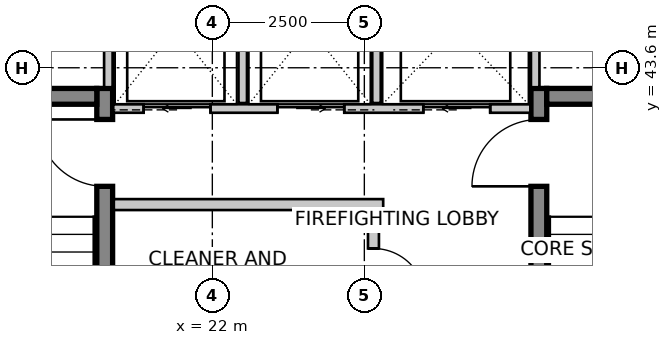
"""IFC4 building model, lengths in metres.
Left out: names, types, materials, properties, quantities, classifications, styles, units other than length and angle.
Written with IfcOpenShell. Run it as: python <this file> out.ifc"""

import sys

from ifc_helpers import new_model, si_unit, direction, frame, frame_2d, origin, place, context, subcontext, project, spatial, rectangle, extrude, source, transform, mapped, element, fill, save


model = new_model("IFC4")
c1 = context("Model", 3, precision=1e-05, world=origin(), true_north=direction((0.0, 1.0)))
c2 = subcontext(c1, "Body", "Model", "MODEL_VIEW")
j1 = project(units=[si_unit("LENGTHUNIT", "METRE"), si_unit("PLANEANGLEUNIT", "RADIAN")], contexts=[c1])
p1 = place(None, origin())
s1 = spatial("IfcSite", under=j1, at=p1, CompositionType="ELEMENT")
p2 = place(p1, origin())
s2 = spatial("IfcBuilding", under=s1, at=p2, CompositionType="ELEMENT")
p3 = place(p2, frame((0.0, 0.0, 79.0)))
s3 = spatial("IfcBuildingStorey", under=s2, at=p3, CompositionType="ELEMENT", Elevation=79.0)
p4 = place(p3, frame((20.23, 34.2, 0.0), z_axis=(0.0, 0.0, 1.0), x_axis=(0.0, 1.0, 0.0)))
e1 = element("IfcWall", 1, at=p4, inside=s3, PredefinedType="SHEAR", context=c2, shape_type="SweptSolid", body=[
    extrude(rectangle(XDim=9.06, YDim=0.26, at=frame_2d((4.53, 0.0))), origin(), (0.0, 0.0, 1.0), 4.0),
])
m1 = source(origin(), c2, "Body", "SweptSolid", [
    extrude(rectangle(XDim=1.1, YDim=2.15, at=frame_2d((0.55, 1.075))), frame((0.0, 0.14, 0.0), z_axis=(0.0, -1.0, 0.0), x_axis=(1.0, 0.0, 0.0)), (0.0, 0.0, 1.0), 0.28),
])
p5 = place(p4, frame((7.45, 0.0, 0.0)))
e2 = element("IfcOpeningElement", 2, at=p5, cuts=e1, PredefinedType="OPENING", context=c2, shape_type="MappedRepresentation", body=[
    mapped(m1, transform((0.0, 0.0, 0.0), scale=1.0)),
])
p6 = place(p3, frame((27.37, 34.2, 0.0), z_axis=(0.0, 0.0, 1.0), x_axis=(0.0, 1.0, 0.0)))
e3 = element("IfcWall", 3, at=p6, inside=s3, PredefinedType="SHEAR", context=c2, shape_type="SweptSolid", body=[
    extrude(rectangle(XDim=9.06, YDim=0.26, at=frame_2d((4.53, 0.0))), origin(), (0.0, 0.0, 1.0), 4.0),
])
p7 = place(p6, frame((7.45, 0.0, 0.0)))
e4 = element("IfcOpeningElement", 4, at=p7, cuts=e3, PredefinedType="OPENING", context=c2, shape_type="MappedRepresentation", body=[
    mapped(m1, transform((0.0, 0.0, 0.0), scale=1.0)),
])
for number, where, z_axis, x_axis in (
    (5, (16.6, 43.13, 0.0), (0.0, 0.0, 1.0), (1.0, 0.0, 0.0)),
    (6, (27.5, 43.13, 0.0), (0.0, 0.0, 1.0), (1.0, 0.0, 0.0)),
):
    element("IfcWall", number, at=place(p3, frame(where, z_axis=z_axis, x_axis=x_axis)), inside=s3, PredefinedType="SHEAR", context=c2, shape_type="SweptSolid", body=[
        extrude(rectangle(XDim=3.5, YDim=0.26, at=frame_2d((1.75, 0.0))), origin(), (0.0, 0.0, 1.0), 4.0),
    ])
p8 = place(p3, frame((20.37, 42.93, 0.0), z_axis=(0.0, 0.0, 1.0), x_axis=(1.0, 0.0, 0.0)))
e7 = element("IfcWall", 7, at=p8, inside=s3, PredefinedType="SOLIDWALL", context=c2, shape_type="SweptSolid", body=[
    extrude(rectangle(XDim=6.86, YDim=0.14, at=frame_2d((3.43, 0.0))), origin(), (0.0, 0.0, 1.0), 3.75),
])
m2 = source(origin(), c2, "Body", "SweptSolid", [
    extrude(rectangle(XDim=1.1, YDim=2.15, at=frame_2d((0.55, 1.075))), frame((0.0, 0.08, 0.0), z_axis=(0.0, -1.0, 0.0), x_axis=(1.0, 0.0, 0.0)), (0.0, 0.0, 1.0), 0.16),
])
p9 = place(p8, frame((0.5, 0.0, 0.0)))
e8 = element("IfcOpeningElement", 8, at=p9, cuts=e7, PredefinedType="OPENING", context=c2, shape_type="MappedRepresentation", body=[
    mapped(m2, transform((0.0, 0.0, 0.0), scale=1.0)),
])
p10 = place(p8, frame((2.7, 0.0, 0.0)))
e9 = element("IfcOpeningElement", 9, at=p10, cuts=e7, PredefinedType="OPENING", context=c2, shape_type="MappedRepresentation", body=[
    mapped(m2, transform((0.0, 0.0, 0.0), scale=1.0)),
])
p11 = place(p8, frame((5.1, 0.0, 0.0)))
e10 = element("IfcOpeningElement", 10, at=p11, cuts=e7, PredefinedType="OPENING", context=c2, shape_type="MappedRepresentation", body=[
    mapped(m2, transform((0.0, 0.0, 0.0), scale=1.0)),
])
for number, where, z_axis, x_axis in (
    (11, (20.29, 43.28, 0.0), (0.0, 0.0, 1.0), (0.0, 1.0, 0.0)),
    (12, (27.31, 43.28, 0.0), (0.0, 0.0, 1.0), (0.0, 1.0, 0.0)),
):
    element("IfcWall", number, at=place(p3, frame(where, z_axis=z_axis, x_axis=x_axis)), inside=s3, PredefinedType="SOLIDWALL", context=c2, shape_type="SweptSolid", body=[
        extrude(rectangle(XDim=2.3, YDim=0.14, at=frame_2d((1.15, 0.0))), origin(), (0.0, 0.0, 1.0), 3.75),
    ])
for number, where, z_axis, x_axis in (
    (13, (22.5, 43.02, 0.0), (0.0, 0.0, 1.0), (0.0, 1.0, 0.0)),
    (14, (24.7, 43.02, 0.0), (0.0, 0.0, 1.0), (0.0, 1.0, 0.0)),
):
    element("IfcWall", number, at=place(p3, frame(where, z_axis=z_axis, x_axis=x_axis)), inside=s3, PredefinedType="SOLIDWALL", context=c2, shape_type="SweptSolid", body=[
        extrude(rectangle(XDim=2.56, YDim=0.14, at=frame_2d((1.28, 0.0))), origin(), (0.0, 0.0, 1.0), 3.75),
    ])
p12 = place(p3, frame((24.81, 41.35, 0.0), z_axis=(0.0, 0.0, 1.0), x_axis=(-1.0, 0.0, 0.0)))
e15 = element("IfcWall", 15, at=p12, inside=s3, PredefinedType="PARTITIONING", context=c2, shape_type="SweptSolid", body=[
    extrude(rectangle(XDim=4.43, YDim=0.18, at=frame_2d((2.215, 0.0))), origin(), (0.0, 0.0, 1.0), 3.75),
])
p13 = place(p3, frame((24.65, 41.256, 0.0), z_axis=(0.0, 0.0, 1.0), x_axis=(0.0, -1.0, 0.0)))
e16 = element("IfcWall", 16, at=p13, inside=s3, PredefinedType="PARTITIONING", context=c2, shape_type="SweptSolid", body=[
    extrude(rectangle(XDim=2.106, YDim=0.18, at=frame_2d((1.053, 0.0))), origin(), (0.0, 0.0, 1.0), 3.75),
])
m3 = source(origin(), c2, "Body", "SweptSolid", [
    extrude(rectangle(XDim=0.85, YDim=2.15, at=frame_2d((0.425, 1.075))), frame((0.0, 0.1, 0.0), z_axis=(0.0, -1.0, 0.0), x_axis=(1.0, 0.0, 0.0)), (0.0, 0.0, 1.0), 0.2),
])
p14 = place(p13, frame((0.628, 0.0, 0.0)))
e17 = element("IfcOpeningElement", 17, at=p14, cuts=e16, PredefinedType="OPENING", context=c2, shape_type="MappedRepresentation", body=[
    mapped(m3, transform((0.0, 0.0, 0.0), scale=1.0)),
])
m4 = source(origin(), c2, "Body", "SweptSolid", [
    extrude(rectangle(XDim=1.1, YDim=2.15, at=frame_2d((0.55, 1.075))), frame((0.0, 0.025, 0.0), z_axis=(0.0, -1.0, 0.0), x_axis=(1.0, 0.0, 0.0)), (0.0, 0.0, 1.0), 0.05),
])
p15 = place(p9, origin())
e18 = element("IfcDoor", 18, at=p15, inside=s3, OperationType="SLIDING_TO_LEFT", PredefinedType="DOOR", context=c2, shape_type="MappedRepresentation", body=[
    mapped(m4, transform((0.0, 0.0, 0.0), scale=1.0)),
])
fill(e8, e18)
p16 = place(p10, origin())
e19 = element("IfcDoor", 19, at=p16, inside=s3, OperationType="SLIDING_TO_RIGHT", PredefinedType="DOOR", context=c2, shape_type="MappedRepresentation", body=[
    mapped(m4, transform((0.0, 0.0, 0.0), scale=1.0)),
])
fill(e9, e19)
m5 = source(origin(), c2, "Body", "SweptSolid", [
    extrude(rectangle(XDim=1.1, YDim=2.15, at=frame_2d((0.55, 1.075))), frame((0.0, 0.025, 0.0), z_axis=(0.0, -1.0, 0.0), x_axis=(1.0, 0.0, 0.0)), (0.0, 0.0, 1.0), 0.05),
])
p17 = place(p11, origin())
e20 = element("IfcDoor", 20, at=p17, inside=s3, OperationType="SLIDING_TO_LEFT", PredefinedType="DOOR", context=c2, shape_type="MappedRepresentation", body=[
    mapped(m5, transform((0.0, 0.0, 0.0), scale=1.0)),
])
fill(e10, e20)
m6 = source(origin(), c2, "Body", "SweptSolid", [
    extrude(rectangle(XDim=1.1, YDim=2.15, at=frame_2d((0.55, 1.075))), frame((0.0, 0.025, 0.0), z_axis=(0.0, -1.0, 0.0), x_axis=(1.0, 0.0, 0.0)), (0.0, 0.0, 1.0), 0.05),
])
p18 = place(p5, origin())
e21 = element("IfcDoor", 21, at=p18, inside=s3, OperationType="SINGLE_SWING_RIGHT", PredefinedType="DOOR", context=c2, shape_type="MappedRepresentation", body=[
    mapped(m6, transform((0.0, 0.0, 0.0), scale=1.0)),
])
fill(e2, e21)
p19 = place(p7, origin())
e22 = element("IfcDoor", 22, at=p19, inside=s3, OperationType="SINGLE_SWING_LEFT", PredefinedType="DOOR", context=c2, shape_type="MappedRepresentation", body=[
    mapped(m6, transform((0.0, 0.0, 0.0), scale=1.0)),
])
fill(e4, e22)
m7 = source(origin(), c2, "Body", "SweptSolid", [
    extrude(rectangle(XDim=0.85, YDim=2.15, at=frame_2d((0.425, 1.075))), frame((0.0, 0.025, 0.0), z_axis=(0.0, -1.0, 0.0), x_axis=(1.0, 0.0, 0.0)), (0.0, 0.0, 1.0), 0.05),
])
p20 = place(p14, origin())
e23 = element("IfcDoor", 23, at=p20, inside=s3, OperationType="SINGLE_SWING_RIGHT", PredefinedType="DOOR", context=c2, shape_type="MappedRepresentation", body=[
    mapped(m7, transform((0.0, 0.0, 0.0), scale=1.0)),
])
fill(e17, e23)
save(model, sys.argv[1])
